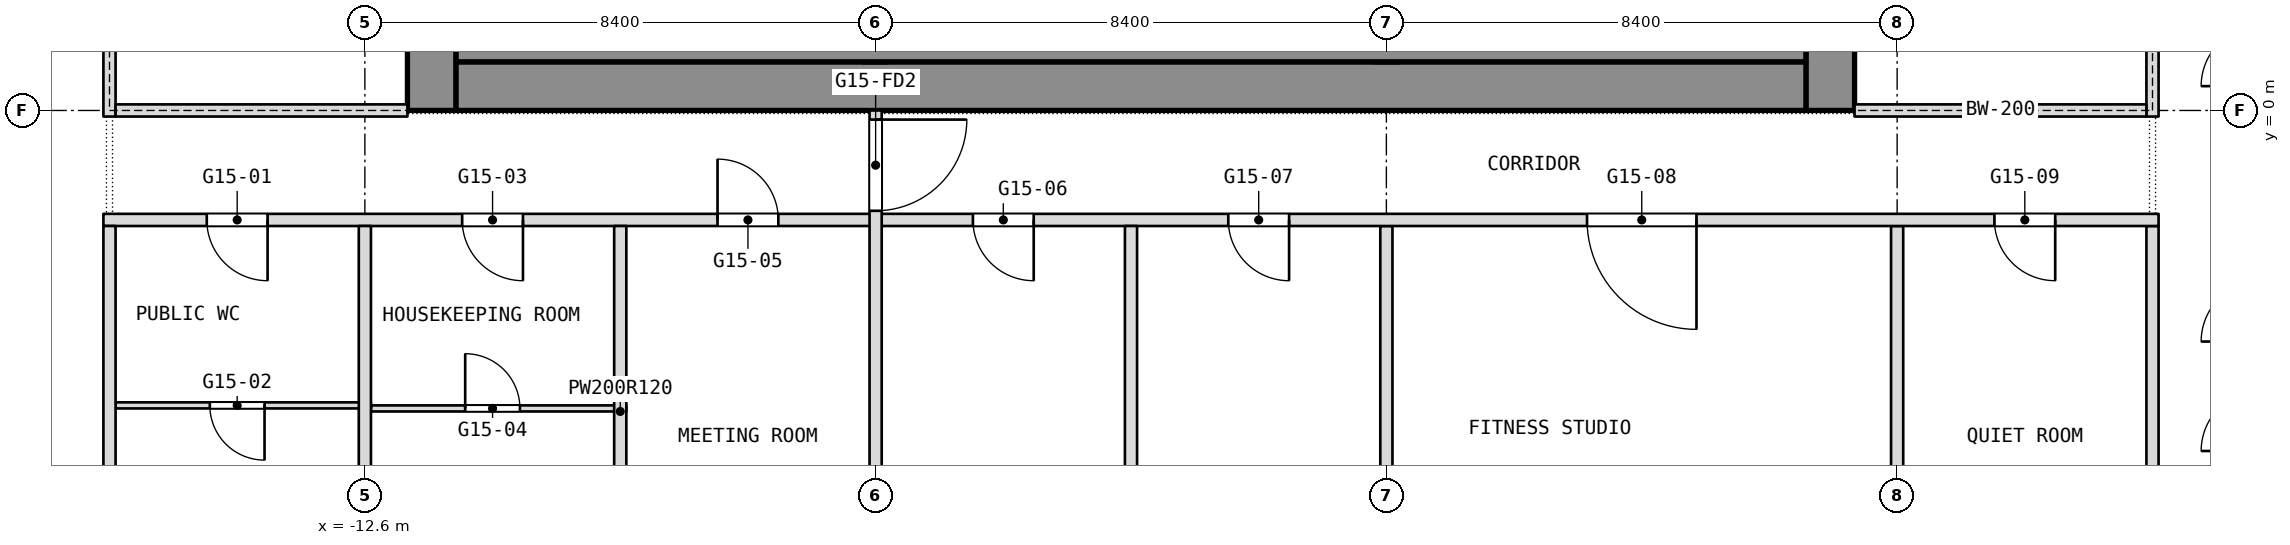
"""IFC4 building model, lengths in metres.
Left out: names, types, materials, properties, quantities, classifications, styles, units other than length and angle.
Written with IfcOpenShell. Run it as: python <this file> out.ifc"""

import sys

from ifc_helpers import new_model, si_unit, direction, frame, frame_2d, origin, place, context, subcontext, project, spatial, rectangle, extrude, element, fill, save


model = new_model("IFC4")
c1 = context("Model", 3, precision=1e-05, world=origin(), true_north=direction((0.0, 1.0)))
c2 = subcontext(c1, "Body", "Model", "MODEL_VIEW")
j1 = project(units=[si_unit("LENGTHUNIT", "METRE"), si_unit("PLANEANGLEUNIT", "RADIAN")], contexts=[c1])
p1 = place(None, origin())
s1 = spatial("IfcSite", under=j1, at=p1, CompositionType="ELEMENT")
p2 = place(p1, origin())
s2 = spatial("IfcBuilding", under=s1, at=p2, CompositionType="ELEMENT")
p3 = place(p2, frame((0.0, 0.0, 187.7)))
s3 = spatial("IfcBuildingStorey", under=s2, at=p3, CompositionType="ELEMENT", Elevation=187.7)
p4 = place(p3, frame((11.5, 0.0, 0.0), z_axis=(0.0, 0.0, 1.0), x_axis=(0.0, 1.0, 0.0)))
e1 = element("IfcWall", 1, at=p4, inside=s3, PredefinedType="SHEAR", context=c2, shape_type="SweptSolid", body=[
    extrude(rectangle(XDim=16.8, YDim=0.8, at=frame_2d((8.4, 0.0))), origin(), (0.0, 0.0, 1.0), 3.6),
])
p5 = place(p4, frame((2.3, 0.0, 0.0)))
e2 = element("IfcOpeningElement", 2, at=p5, cuts=e1, PredefinedType="OPENING", context=c2, shape_type="SweptSolid", body=[
    extrude(rectangle(XDim=1.1, YDim=2.1, at=frame_2d((0.55, 1.05))), frame((0.0, 0.4, 0.0), z_axis=(0.0, -1.0, 0.0), x_axis=(1.0, 0.0, 0.0)), (0.0, 0.0, 1.0), 0.8),
])
p6 = place(p4, frame((4.85, 0.0, 0.0)))
e3 = element("IfcOpeningElement", 3, at=p6, cuts=e1, PredefinedType="OPENING", context=c2, shape_type="SweptSolid", body=[
    extrude(rectangle(XDim=1.1, YDim=2.1, at=frame_2d((0.55, 1.05))), frame((0.0, 0.4, 0.0), z_axis=(0.0, -1.0, 0.0), x_axis=(1.0, 0.0, 0.0)), (0.0, 0.0, 1.0), 0.8),
])
p7 = place(p4, frame((6.825, 0.0, 0.0)))
e4 = element("IfcOpeningElement", 4, at=p7, cuts=e1, PredefinedType="OPENING", context=c2, shape_type="SweptSolid", body=[
    extrude(rectangle(XDim=1.2, YDim=2.1, at=frame_2d((0.6, 1.05))), frame((0.0, 0.4, 0.0), z_axis=(0.0, -1.0, 0.0), x_axis=(1.0, 0.0, 0.0)), (0.0, 0.0, 1.0), 0.8),
])
p8 = place(p4, frame((13.4, 0.0, 0.0)))
e5 = element("IfcOpeningElement", 5, at=p8, cuts=e1, PredefinedType="OPENING", context=c2, shape_type="SweptSolid", body=[
    extrude(rectangle(XDim=1.1, YDim=2.1, at=frame_2d((0.55, 1.05))), frame((0.0, 0.4, 0.0), z_axis=(0.0, -1.0, 0.0), x_axis=(1.0, 0.0, 0.0)), (0.0, 0.0, 1.0), 0.8),
])
p9 = place(p4, frame((10.85, 0.0, 0.0)))
e6 = element("IfcOpeningElement", 6, at=p9, cuts=e1, PredefinedType="OPENING", context=c2, shape_type="SweptSolid", body=[
    extrude(rectangle(XDim=1.1, YDim=2.1, at=frame_2d((0.55, 1.05))), frame((0.0, 0.4, 0.0), z_axis=(0.0, -1.0, 0.0), x_axis=(1.0, 0.0, 0.0)), (0.0, 0.0, 1.0), 0.8),
])
p10 = place(p4, frame((8.775, 0.0, 0.0)))
e7 = element("IfcOpeningElement", 7, at=p10, cuts=e1, PredefinedType="OPENING", context=c2, shape_type="SweptSolid", body=[
    extrude(rectangle(XDim=1.2, YDim=2.1, at=frame_2d((0.6, 1.05))), frame((0.0, 0.4, 0.0), z_axis=(0.0, -1.0, 0.0), x_axis=(1.0, 0.0, 0.0)), (0.0, 0.0, 1.0), 0.8),
])
p11 = place(p3, frame((-11.5, 0.0, 0.0), z_axis=(0.0, 0.0, 1.0), x_axis=(0.0, 1.0, 0.0)))
e8 = element("IfcWall", 8, at=p11, inside=s3, PredefinedType="SHEAR", context=c2, shape_type="SweptSolid", body=[
    extrude(rectangle(XDim=16.8, YDim=0.8, at=frame_2d((8.4, 0.0))), origin(), (0.0, 0.0, 1.0), 3.6),
])
p12 = place(p11, frame((3.6, 0.0, 0.0)))
e9 = element("IfcOpeningElement", 9, at=p12, cuts=e8, PredefinedType="OPENING", context=c2, shape_type="SweptSolid", body=[
    extrude(rectangle(XDim=0.9, YDim=2.1, at=frame_2d((0.45, 1.05))), frame((0.0, 0.4, 0.0), z_axis=(0.0, -1.0, 0.0), x_axis=(1.0, 0.0, 0.0)), (0.0, 0.0, 1.0), 0.8),
])
p13 = place(p11, frame((6.825, 0.0, 0.0)))
e10 = element("IfcOpeningElement", 10, at=p13, cuts=e8, PredefinedType="OPENING", context=c2, shape_type="SweptSolid", body=[
    extrude(rectangle(XDim=1.2, YDim=2.1, at=frame_2d((0.6, 1.05))), frame((0.0, 0.4, 0.0), z_axis=(0.0, -1.0, 0.0), x_axis=(1.0, 0.0, 0.0)), (0.0, 0.0, 1.0), 0.8),
])
p14 = place(p11, frame((14.212, 0.0, 0.0)))
e11 = element("IfcOpeningElement", 11, at=p14, cuts=e8, PredefinedType="OPENING", context=c2, shape_type="SweptSolid", body=[
    extrude(rectangle(XDim=0.9, YDim=2.1, at=frame_2d((0.45, 1.05))), frame((0.0, 0.4, 0.0), z_axis=(0.0, -1.0, 0.0), x_axis=(1.0, 0.0, 0.0)), (0.0, 0.0, 1.0), 0.8),
])
p15 = place(p11, frame((11.587, 0.0, 0.0)))
e12 = element("IfcOpeningElement", 12, at=p15, cuts=e8, PredefinedType="OPENING", context=c2, shape_type="SweptSolid", body=[
    extrude(rectangle(XDim=0.9, YDim=2.1, at=frame_2d((0.45, 1.05))), frame((0.0, 0.4, 0.0), z_axis=(0.0, -1.0, 0.0), x_axis=(1.0, 0.0, 0.0)), (0.0, 0.0, 1.0), 0.8),
])
p16 = place(p11, frame((8.775, 0.0, 0.0)))
e13 = element("IfcOpeningElement", 13, at=p16, cuts=e8, PredefinedType="OPENING", context=c2, shape_type="SweptSolid", body=[
    extrude(rectangle(XDim=1.2, YDim=2.1, at=frame_2d((0.6, 1.05))), frame((0.0, 0.4, 0.0), z_axis=(0.0, -1.0, 0.0), x_axis=(1.0, 0.0, 0.0)), (0.0, 0.0, 1.0), 0.8),
])
p17 = place(p3, frame((-11.1, 0.4, 0.0), z_axis=(0.0, 0.0, 1.0), x_axis=(1.0, 0.0, 0.0)))
e14 = element("IfcWall", 14, at=p17, inside=s3, PredefinedType="SHEAR", context=c2, shape_type="SweptSolid", body=[
    extrude(rectangle(XDim=22.2, YDim=0.8, at=frame_2d((11.1, 0.0))), origin(), (0.0, 0.0, 1.0), 3.6),
])
p18 = place(p3, frame((-4.2, 0.8, 0.0), z_axis=(0.0, 0.0, 1.0), x_axis=(0.0, 1.0, 0.0)))
e15 = element("IfcWall", 15, at=p18, inside=s3, PredefinedType="SHEAR", context=c2, shape_type="SweptSolid", body=[
    extrude(rectangle(XDim=15.2, YDim=0.4, at=frame_2d((7.6, 0.0))), origin(), (0.0, 0.0, 1.0), 3.6),
])
p19 = place(p18, frame((8.5, 0.0, 0.0)))
e16 = element("IfcOpeningElement", 16, at=p19, cuts=e15, PredefinedType="OPENING", context=c2, shape_type="SweptSolid", body=[
    extrude(rectangle(XDim=1.2, YDim=2.1, at=frame_2d((0.6, 1.05))), frame((0.0, 0.2, 0.0), z_axis=(0.0, -1.0, 0.0), x_axis=(1.0, 0.0, 0.0)), (0.0, 0.0, 1.0), 0.4),
])
p20 = place(p3, frame((4.2, 0.8, 0.0), z_axis=(0.0, 0.0, 1.0), x_axis=(0.0, 1.0, 0.0)))
e17 = element("IfcWall", 17, at=p20, inside=s3, PredefinedType="SHEAR", context=c2, shape_type="SweptSolid", body=[
    extrude(rectangle(XDim=15.2, YDim=0.4, at=frame_2d((7.6, 0.0))), origin(), (0.0, 0.0, 1.0), 3.6),
])
p21 = place(p20, frame((5.95, 0.0, 0.0)))
e18 = element("IfcOpeningElement", 18, at=p21, cuts=e17, PredefinedType="OPENING", context=c2, shape_type="SweptSolid", body=[
    extrude(rectangle(XDim=1.2, YDim=2.1, at=frame_2d((0.6, 1.05))), frame((0.0, 0.2, 0.0), z_axis=(0.0, -1.0, 0.0), x_axis=(1.0, 0.0, 0.0)), (0.0, 0.0, 1.0), 0.4),
])
for number, where, z_axis, x_axis in (
    (19, (16.8, -7.8, 0.0), (0.0, 0.0, 1.0), (0.0, 1.0, 0.0)),
    (20, (12.6, -7.8, 0.0), (0.0, 0.0, 1.0), (0.0, 1.0, 0.0)),
):
    element("IfcWall", number, at=place(p3, frame(where, z_axis=z_axis, x_axis=x_axis)), inside=s3, PredefinedType="PARTITIONING", context=c2, shape_type="SweptSolid", body=[
        extrude(rectangle(XDim=5.9, YDim=0.2, at=frame_2d((2.95, 0.0))), origin(), (0.0, 0.0, 1.0), 3.34),
    ])
p22 = place(p3, frame((-12.5, -4.9, 0.0), z_axis=(0.0, 0.0, 1.0), x_axis=(1.0, 0.0, 0.0)))
e21 = element("IfcWall", 21, at=p22, inside=s3, PredefinedType="PARTITIONING", context=c2, shape_type="SweptSolid", body=[
    extrude(rectangle(XDim=4.2, YDim=0.1, at=frame_2d((2.1, 0.0))), origin(), (0.0, 0.0, 1.0), 3.34),
])
p23 = place(p22, frame((1.55, 0.0, 0.0)))
e22 = element("IfcOpeningElement", 22, at=p23, cuts=e21, PredefinedType="OPENING", context=c2, shape_type="SweptSolid", body=[
    extrude(rectangle(XDim=0.9, YDim=2.1, at=frame_2d((0.45, 1.05))), frame((0.0, 0.05, 0.0), z_axis=(0.0, -1.0, 0.0), x_axis=(1.0, 0.0, 0.0)), (0.0, 0.0, 1.0), 0.1),
])
p24 = place(p3, frame((-16.7, -4.85, 0.0), z_axis=(0.0, 0.0, 1.0), x_axis=(1.0, 0.0, 0.0)))
e23 = element("IfcWall", 23, at=p24, inside=s3, PredefinedType="PARTITIONING", context=c2, shape_type="SweptSolid", body=[
    extrude(rectangle(XDim=4.2, YDim=0.1, at=frame_2d((2.1, 0.0))), origin(), (0.0, 0.0, 1.0), 3.34),
])
p25 = place(p24, frame((1.55, 0.0, 0.0)))
e24 = element("IfcOpeningElement", 24, at=p25, cuts=e23, PredefinedType="OPENING", context=c2, shape_type="SweptSolid", body=[
    extrude(rectangle(XDim=0.9, YDim=2.1, at=frame_2d((0.45, 1.05))), frame((0.0, 0.05, 0.0), z_axis=(0.0, -1.0, 0.0), x_axis=(1.0, 0.0, 0.0)), (0.0, 0.0, 1.0), 0.1),
])
p26 = place(p3, frame((4.2, -11.6, 0.0), z_axis=(0.0, 0.0, 1.0), x_axis=(0.0, 1.0, 0.0)))
e25 = element("IfcWall", 25, at=p26, inside=s3, PredefinedType="PARTITIONING", context=c2, shape_type="SweptSolid", body=[
    extrude(rectangle(XDim=9.7, YDim=0.2, at=frame_2d((4.85, 0.0))), origin(), (0.0, 0.0, 1.0), 3.34),
])
p27 = place(p3, frame((-16.9, -1.8, 0.0), z_axis=(0.0, 0.0, 1.0), x_axis=(1.0, 0.0, 0.0)))
e26 = element("IfcWall", 26, at=p27, inside=s3, PredefinedType="PARTITIONING", context=c2, shape_type="SweptSolid", body=[
    extrude(rectangle(XDim=33.8, YDim=0.2, at=frame_2d((16.9, 0.0))), origin(), (0.0, 0.0, 1.0), 3.34),
])
p28 = place(p27, frame((1.7, 0.0, 0.0)))
e27 = element("IfcOpeningElement", 27, at=p28, cuts=e26, PredefinedType="OPENING", context=c2, shape_type="SweptSolid", body=[
    extrude(rectangle(XDim=1.0, YDim=2.1, at=frame_2d((0.5, 1.05))), frame((0.0, 0.1, 0.0), z_axis=(0.0, -1.0, 0.0), x_axis=(1.0, 0.0, 0.0)), (0.0, 0.0, 1.0), 0.2),
])
p29 = place(p27, frame((5.9, 0.0, 0.0)))
e28 = element("IfcOpeningElement", 28, at=p29, cuts=e26, PredefinedType="OPENING", context=c2, shape_type="SweptSolid", body=[
    extrude(rectangle(XDim=1.0, YDim=2.1, at=frame_2d((0.5, 1.05))), frame((0.0, 0.1, 0.0), z_axis=(0.0, -1.0, 0.0), x_axis=(1.0, 0.0, 0.0)), (0.0, 0.0, 1.0), 0.2),
])
p30 = place(p27, frame((10.1, 0.0, 0.0)))
e29 = element("IfcOpeningElement", 29, at=p30, cuts=e26, PredefinedType="OPENING", context=c2, shape_type="SweptSolid", body=[
    extrude(rectangle(XDim=1.0, YDim=2.1, at=frame_2d((0.5, 1.05))), frame((0.0, 0.1, 0.0), z_axis=(0.0, -1.0, 0.0), x_axis=(1.0, 0.0, 0.0)), (0.0, 0.0, 1.0), 0.2),
])
p31 = place(p27, frame((14.3, 0.0, 0.0)))
e30 = element("IfcOpeningElement", 30, at=p31, cuts=e26, PredefinedType="OPENING", context=c2, shape_type="SweptSolid", body=[
    extrude(rectangle(XDim=1.0, YDim=2.1, at=frame_2d((0.5, 1.05))), frame((0.0, 0.1, 0.0), z_axis=(0.0, -1.0, 0.0), x_axis=(1.0, 0.0, 0.0)), (0.0, 0.0, 1.0), 0.2),
])
p32 = place(p27, frame((18.5, 0.0, 0.0)))
e31 = element("IfcOpeningElement", 31, at=p32, cuts=e26, PredefinedType="OPENING", context=c2, shape_type="SweptSolid", body=[
    extrude(rectangle(XDim=1.0, YDim=2.1, at=frame_2d((0.5, 1.05))), frame((0.0, 0.1, 0.0), z_axis=(0.0, -1.0, 0.0), x_axis=(1.0, 0.0, 0.0)), (0.0, 0.0, 1.0), 0.2),
])
p33 = place(p27, frame((24.4, 0.0, 0.0)))
e32 = element("IfcOpeningElement", 32, at=p33, cuts=e26, PredefinedType="OPENING", context=c2, shape_type="SweptSolid", body=[
    extrude(rectangle(XDim=1.8, YDim=2.1, at=frame_2d((0.9, 1.05))), frame((0.0, 0.1, 0.0), z_axis=(0.0, -1.0, 0.0), x_axis=(1.0, 0.0, 0.0)), (0.0, 0.0, 1.0), 0.2),
])
p34 = place(p27, frame((31.1, 0.0, 0.0)))
e33 = element("IfcOpeningElement", 33, at=p34, cuts=e26, PredefinedType="OPENING", context=c2, shape_type="SweptSolid", body=[
    extrude(rectangle(XDim=1.0, YDim=2.1, at=frame_2d((0.5, 1.05))), frame((0.0, 0.1, 0.0), z_axis=(0.0, -1.0, 0.0), x_axis=(1.0, 0.0, 0.0)), (0.0, 0.0, 1.0), 0.2),
])
p35 = place(p3, frame((0.0, -11.6, 0.0), z_axis=(0.0, 0.0, 1.0), x_axis=(0.0, 1.0, 0.0)))
e34 = element("IfcWall", 34, at=p35, inside=s3, PredefinedType="PARTITIONING", context=c2, shape_type="SweptSolid", body=[
    extrude(rectangle(XDim=9.7, YDim=0.2, at=frame_2d((4.85, 0.0))), origin(), (0.0, 0.0, 1.0), 3.34),
])
p36 = place(p3, frame((-4.2, -13.6, 0.0), z_axis=(0.0, 0.0, 1.0), x_axis=(0.0, 1.0, 0.0)))
e35 = element("IfcWall", 35, at=p36, inside=s3, PredefinedType="PARTITIONING", context=c2, shape_type="SweptSolid", body=[
    extrude(rectangle(XDim=13.6, YDim=0.2, at=frame_2d((6.8, 0.0))), origin(), (0.0, 0.0, 1.0), 3.34),
])
p37 = place(p36, frame((11.95, 0.0, 0.0)))
e36 = element("IfcOpeningElement", 36, at=p37, cuts=e35, PredefinedType="OPENING", context=c2, shape_type="SweptSolid", body=[
    extrude(rectangle(XDim=1.5, YDim=2.1, at=frame_2d((0.75, 1.05))), frame((0.0, 0.1, 0.0), z_axis=(0.0, -1.0, 0.0), x_axis=(1.0, 0.0, 0.0)), (0.0, 0.0, 1.0), 0.2),
])
p38 = place(p36, frame((0.25, 0.0, 0.0)))
e37 = element("IfcOpeningElement", 37, at=p38, cuts=e35, PredefinedType="OPENING", context=c2, shape_type="SweptSolid", body=[
    extrude(rectangle(XDim=1.5, YDim=2.1, at=frame_2d((0.75, 1.05))), frame((0.0, 0.1, 0.0), z_axis=(0.0, -1.0, 0.0), x_axis=(1.0, 0.0, 0.0)), (0.0, 0.0, 1.0), 0.2),
])
p39 = place(p3, frame((-8.4, -8.0, 0.0), z_axis=(0.0, 0.0, 1.0), x_axis=(0.0, 1.0, 0.0)))
e38 = element("IfcWall", 38, at=p39, inside=s3, PredefinedType="PARTITIONING", context=c2, shape_type="SweptSolid", body=[
    extrude(rectangle(XDim=6.1, YDim=0.2, at=frame_2d((3.05, 0.0))), origin(), (0.0, 0.0, 1.0), 3.34),
])
p40 = place(p3, frame((-12.6, -7.8, 0.0), z_axis=(0.0, 0.0, 1.0), x_axis=(0.0, 1.0, 0.0)))
e39 = element("IfcWall", 39, at=p40, inside=s3, PredefinedType="PARTITIONING", context=c2, shape_type="SweptSolid", body=[
    extrude(rectangle(XDim=5.9, YDim=0.2, at=frame_2d((2.95, 0.0))), origin(), (0.0, 0.0, 1.0), 3.34),
])
p41 = place(p3, frame((-16.8, -8.0, 0.0), z_axis=(0.0, 0.0, 1.0), x_axis=(0.0, 1.0, 0.0)))
e40 = element("IfcWall", 40, at=p41, inside=s3, PredefinedType="PARTITIONING", context=c2, shape_type="SweptSolid", body=[
    extrude(rectangle(XDim=6.1, YDim=0.2, at=frame_2d((3.05, 0.0))), origin(), (0.0, 0.0, 1.0), 3.34),
])
p42 = place(p3, frame((-11.1, 1.15, 0.0), z_axis=(0.0, 0.0, 1.0), x_axis=(1.0, 0.0, 0.0)))
e41 = element("IfcWall", 41, at=p42, inside=s3, PredefinedType="PARTITIONING", context=c2, shape_type="SweptSolid", body=[
    extrude(rectangle(XDim=22.2, YDim=0.7, at=frame_2d((11.1, 0.0))), origin(), (0.0, 0.0, 1.0), 3.34),
])
p43 = place(p3, frame((-16.8, -0.1, 0.0), z_axis=(0.0, 0.0, 1.0), x_axis=(0.0, 1.0, 0.0)))
e42 = element("IfcWall", 42, at=p43, inside=s3, PredefinedType="PARTITIONING", context=c2, shape_type="SweptSolid", body=[
    extrude(rectangle(XDim=17.0, YDim=0.2, at=frame_2d((8.5, 0.0))), origin(), (0.0, 0.0, 1.0), 3.34),
])
p44 = place(p43, frame((2.2, 0.0, 0.0)))
e43 = element("IfcOpeningElement", 43, at=p44, cuts=e42, PredefinedType="OPENING", context=c2, shape_type="SweptSolid", body=[
    extrude(rectangle(XDim=1.8, YDim=2.1, at=frame_2d((0.9, 1.05))), frame((0.0, 0.1, 0.0), z_axis=(0.0, -1.0, 0.0), x_axis=(1.0, 0.0, 0.0)), (0.0, 0.0, 1.0), 0.2),
])
p45 = place(p43, frame((13.0, 0.0, 0.0)))
e44 = element("IfcOpeningElement", 44, at=p45, cuts=e42, PredefinedType="OPENING", context=c2, shape_type="SweptSolid", body=[
    extrude(rectangle(XDim=1.8, YDim=2.1, at=frame_2d((0.9, 1.05))), frame((0.0, 0.1, 0.0), z_axis=(0.0, -1.0, 0.0), x_axis=(1.0, 0.0, 0.0)), (0.0, 0.0, 1.0), 0.2),
])
p46 = place(p3, frame((-16.7, 0.0, 0.0), z_axis=(0.0, 0.0, 1.0), x_axis=(1.0, 0.0, 0.0)))
e45 = element("IfcWall", 45, at=p46, inside=s3, PredefinedType="PARTITIONING", context=c2, shape_type="SweptSolid", body=[
    extrude(rectangle(XDim=4.8, YDim=0.2, at=frame_2d((2.4, 0.0))), origin(), (0.0, 0.0, 1.0), 2.94),
])
p47 = place(p3, frame((16.8, -0.1, 0.0), z_axis=(0.0, 0.0, 1.0), x_axis=(0.0, 1.0, 0.0)))
e46 = element("IfcWall", 46, at=p47, inside=s3, PredefinedType="PARTITIONING", context=c2, shape_type="SweptSolid", body=[
    extrude(rectangle(XDim=17.0, YDim=0.2, at=frame_2d((8.5, 0.0))), origin(), (0.0, 0.0, 1.0), 3.34),
])
p48 = place(p47, frame((2.2, 0.0, 0.0)))
e47 = element("IfcOpeningElement", 47, at=p48, cuts=e46, PredefinedType="OPENING", context=c2, shape_type="SweptSolid", body=[
    extrude(rectangle(XDim=1.8, YDim=2.1, at=frame_2d((0.9, 1.05))), frame((0.0, 0.1, 0.0), z_axis=(0.0, -1.0, 0.0), x_axis=(1.0, 0.0, 0.0)), (0.0, 0.0, 1.0), 0.2),
])
p49 = place(p47, frame((13.0, 0.0, 0.0)))
e48 = element("IfcOpeningElement", 48, at=p49, cuts=e46, PredefinedType="OPENING", context=c2, shape_type="SweptSolid", body=[
    extrude(rectangle(XDim=1.8, YDim=2.1, at=frame_2d((0.9, 1.05))), frame((0.0, 0.1, 0.0), z_axis=(0.0, -1.0, 0.0), x_axis=(1.0, 0.0, 0.0)), (0.0, 0.0, 1.0), 0.2),
])
p50 = place(p3, frame((11.9, 0.0, 0.0), z_axis=(0.0, 0.0, 1.0), x_axis=(1.0, 0.0, 0.0)))
e49 = element("IfcWall", 49, at=p50, inside=s3, PredefinedType="PARTITIONING", context=c2, shape_type="SweptSolid", body=[
    extrude(rectangle(XDim=4.8, YDim=0.2, at=frame_2d((2.4, 0.0))), origin(), (0.0, 0.0, 1.0), 2.94),
])
p51 = place(p23, origin())
e50 = element("IfcDoor", 50, at=p51, inside=s3, OperationType="SINGLE_SWING_RIGHT", PredefinedType="DOOR", context=c2, shape_type="SweptSolid", body=[
    extrude(rectangle(XDim=0.9, YDim=2.1, at=frame_2d((0.45, 1.05))), frame((0.0, 0.025, 0.0), z_axis=(0.0, -1.0, 0.0), x_axis=(1.0, 0.0, 0.0)), (0.0, 0.0, 1.0), 0.05),
])
fill(e22, e50)
p52 = place(p25, origin())
e51 = element("IfcDoor", 51, at=p52, inside=s3, OperationType="SINGLE_SWING_RIGHT", PredefinedType="DOOR", context=c2, shape_type="SweptSolid", body=[
    extrude(rectangle(XDim=0.9, YDim=2.1, at=frame_2d((0.45, 1.05))), frame((0.0, 0.025, 0.0), z_axis=(0.0, -1.0, 0.0), x_axis=(1.0, 0.0, 0.0)), (0.0, 0.0, 1.0), 0.05),
])
fill(e24, e51)
p53 = place(p28, origin())
e52 = element("IfcDoor", 52, at=p53, inside=s3, OperationType="SINGLE_SWING_LEFT", PredefinedType="DOOR", context=c2, shape_type="SweptSolid", body=[
    extrude(rectangle(XDim=1.0, YDim=2.1, at=frame_2d((0.5, 1.05))), frame((0.0, 0.025, 0.0), z_axis=(0.0, -1.0, 0.0), x_axis=(1.0, 0.0, 0.0)), (0.0, 0.0, 1.0), 0.05),
])
fill(e27, e52)
p54 = place(p29, origin())
e53 = element("IfcDoor", 53, at=p54, inside=s3, OperationType="SINGLE_SWING_LEFT", PredefinedType="DOOR", context=c2, shape_type="SweptSolid", body=[
    extrude(rectangle(XDim=1.0, YDim=2.1, at=frame_2d((0.5, 1.05))), frame((0.0, 0.025, 0.0), z_axis=(0.0, -1.0, 0.0), x_axis=(1.0, 0.0, 0.0)), (0.0, 0.0, 1.0), 0.05),
])
fill(e28, e53)
p55 = place(p30, origin())
e54 = element("IfcDoor", 54, at=p55, inside=s3, OperationType="SINGLE_SWING_RIGHT", PredefinedType="DOOR", context=c2, shape_type="SweptSolid", body=[
    extrude(rectangle(XDim=1.0, YDim=2.1, at=frame_2d((0.5, 1.05))), frame((0.0, 0.025, 0.0), z_axis=(0.0, -1.0, 0.0), x_axis=(1.0, 0.0, 0.0)), (0.0, 0.0, 1.0), 0.05),
])
fill(e29, e54)
p56 = place(p31, origin())
e55 = element("IfcDoor", 55, at=p56, inside=s3, OperationType="SINGLE_SWING_LEFT", PredefinedType="DOOR", context=c2, shape_type="SweptSolid", body=[
    extrude(rectangle(XDim=1.0, YDim=2.1, at=frame_2d((0.5, 1.05))), frame((0.0, 0.025, 0.0), z_axis=(0.0, -1.0, 0.0), x_axis=(1.0, 0.0, 0.0)), (0.0, 0.0, 1.0), 0.05),
])
fill(e30, e55)
p57 = place(p32, origin())
e56 = element("IfcDoor", 56, at=p57, inside=s3, OperationType="SINGLE_SWING_RIGHT", PredefinedType="DOOR", context=c2, shape_type="SweptSolid", body=[
    extrude(rectangle(XDim=1.0, YDim=2.1, at=frame_2d((0.5, 1.05))), frame((0.0, 0.025, 0.0), z_axis=(0.0, -1.0, 0.0), x_axis=(1.0, 0.0, 0.0)), (0.0, 0.0, 1.0), 0.05),
])
fill(e31, e56)
p58 = place(p33, origin())
e57 = element("IfcDoor", 57, at=p58, inside=s3, OperationType="DOUBLE_DOOR_SINGLE_SWING", PredefinedType="DOOR", context=c2, shape_type="SweptSolid", body=[
    extrude(rectangle(XDim=1.8, YDim=2.1, at=frame_2d((0.9, 1.05))), frame((0.0, 0.025, 0.0), z_axis=(0.0, -1.0, 0.0), x_axis=(1.0, 0.0, 0.0)), (0.0, 0.0, 1.0), 0.05),
])
fill(e32, e57)
p59 = place(p34, origin())
e58 = element("IfcDoor", 58, at=p59, inside=s3, OperationType="SINGLE_SWING_RIGHT", PredefinedType="DOOR", context=c2, shape_type="SweptSolid", body=[
    extrude(rectangle(XDim=1.0, YDim=2.1, at=frame_2d((0.5, 1.05))), frame((0.0, 0.025, 0.0), z_axis=(0.0, -1.0, 0.0), x_axis=(1.0, 0.0, 0.0)), (0.0, 0.0, 1.0), 0.05),
])
fill(e33, e58)
p60 = place(p37, origin())
e59 = element("IfcDoor", 59, at=p60, inside=s3, OperationType="DOUBLE_DOOR_DOUBLE_SWING", PredefinedType="DOOR", context=c2, shape_type="SweptSolid", body=[
    extrude(rectangle(XDim=1.5, YDim=2.1, at=frame_2d((0.75, 1.05))), frame((0.0, 0.025, 0.0), z_axis=(0.0, -1.0, 0.0), x_axis=(1.0, 0.0, 0.0)), (0.0, 0.0, 1.0), 0.05),
])
fill(e36, e59)
save(model, sys.argv[1])
